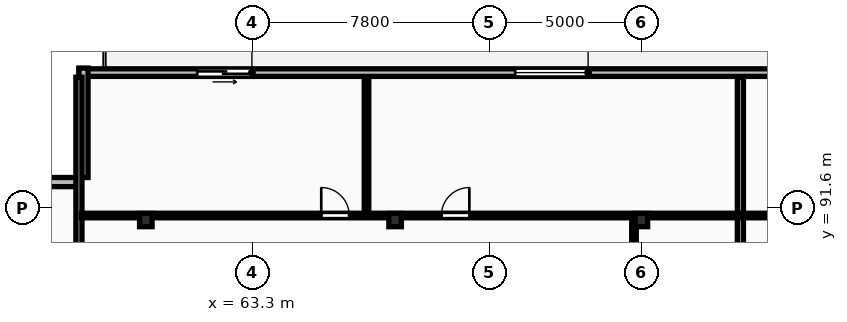
"""IFC4 building model, lengths in metres.
Left out: names, types, materials, properties, quantities, classifications, styles, units other than length and angle.
Written with IfcOpenShell. Run it as: python <this file> out.ifc"""

import sys

from ifc_helpers import new_model, si_unit, direction, frame, frame_2d, origin, origin_2d, place, context, subcontext, project, spatial, rectangle, i_section, extrude, element, fill, save


model = new_model("IFC4")
c1 = context("Model", 3, precision=1e-05, world=origin(), true_north=direction((0.0, 1.0)))
c2 = subcontext(c1, "Body", "Model", "MODEL_VIEW")
j1 = project(units=[si_unit("LENGTHUNIT", "METRE"), si_unit("PLANEANGLEUNIT", "RADIAN")], contexts=[c1])
p1 = place(None, origin())
s1 = spatial("IfcSite", under=j1, at=p1, CompositionType="ELEMENT")
p2 = place(p1, origin())
s2 = spatial("IfcBuilding", under=s1, at=p2, CompositionType="ELEMENT")
p3 = place(p2, frame((0.0, 0.0, 150.1)))
s3 = spatial("IfcBuildingStorey", under=s2, at=p3, CompositionType="ELEMENT", Elevation=150.1)
for number, where, z_axis, x_axis in (
    (1, (59.8, 91.2, 0.0), (0.0, 0.0, 1.0), (1.0, 0.0, 0.0)),
    (2, (68.0, 91.2, 0.0), (0.0, 0.0, 1.0), (1.0, 0.0, 0.0)),
    (3, (76.1, 91.2, 0.0), (0.0, 0.0, 1.0), (1.0, 0.0, 0.0)),
):
    element("IfcColumn", number, at=place(p3, frame(where, z_axis=z_axis, x_axis=x_axis)), inside=s3, PredefinedType="COLUMN", context=c2, shape_type="SweptSolid", body=[
        extrude(i_section(OverallWidth=0.412, OverallDepth=0.437, WebThickness=0.036, FlangeThickness=0.052, FilletRadius=0.015, at=origin_2d()), origin(), (0.0, 0.0, 1.0), 3.6),
    ])
p4 = place(p3, frame((130.6, 96.05, 0.0), z_axis=(0.0, 0.0, 1.0), x_axis=(-1.0, 0.0, 0.0)))
e4 = element("IfcWall", 4, at=p4, inside=s3, PredefinedType="STANDARD", context=c2, shape_type="SweptSolid", body=[
    extrude(rectangle(XDim=73.0, YDim=0.25, at=frame_2d((36.5, 0.0))), origin(), (0.0, 0.0, 1.0), 3.31),
])
p5 = place(p4, frame((67.311, 0.0, 0.0)))
e5 = element("IfcOpeningElement", 5, at=p5, cuts=e4, PredefinedType="OPENING", context=c2, shape_type="SweptSolid", body=[
    extrude(rectangle(XDim=1.8, YDim=2.2, at=frame_2d((0.9, 1.1))), frame((0.0, 0.135, 0.0), z_axis=(0.0, -1.0, 0.0), x_axis=(1.0, 0.0, 0.0)), (0.0, 0.0, 1.0), 0.27),
])
p6 = place(p4, frame((56.252, 0.0, 0.85)))
e6 = element("IfcOpeningElement", 6, at=p6, cuts=e4, PredefinedType="OPENING", context=c2, shape_type="SweptSolid", body=[
    extrude(rectangle(XDim=2.4, YDim=1.9, at=frame_2d((1.2, 0.95))), frame((0.0, 0.135, 0.0), z_axis=(0.0, -1.0, 0.0), x_axis=(1.0, 0.0, 0.0)), (0.0, 0.0, 1.0), 0.27),
])
p7 = place(p4, frame((46.071, 0.0, 0.0)))
e7 = element("IfcOpeningElement", 7, at=p7, cuts=e4, PredefinedType="OPENING", context=c2, shape_type="SweptSolid", body=[
    extrude(rectangle(XDim=1.8, YDim=2.2, at=frame_2d((0.9, 1.1))), frame((0.0, 0.135, 0.0), z_axis=(0.0, -1.0, 0.0), x_axis=(1.0, 0.0, 0.0)), (0.0, 0.0, 1.0), 0.27),
])
p8 = place(p4, frame((36.161, 0.0, 0.85)))
e8 = element("IfcOpeningElement", 8, at=p8, cuts=e4, PredefinedType="OPENING", context=c2, shape_type="SweptSolid", body=[
    extrude(rectangle(XDim=2.4, YDim=1.9, at=frame_2d((1.2, 0.95))), frame((0.0, 0.135, 0.0), z_axis=(0.0, -1.0, 0.0), x_axis=(1.0, 0.0, 0.0)), (0.0, 0.0, 1.0), 0.27),
])
p9 = place(p4, frame((26.569, 0.0, 0.0)))
e9 = element("IfcOpeningElement", 9, at=p9, cuts=e4, PredefinedType="OPENING", context=c2, shape_type="SweptSolid", body=[
    extrude(rectangle(XDim=1.8, YDim=2.2, at=frame_2d((0.9, 1.1))), frame((0.0, 0.135, 0.0), z_axis=(0.0, -1.0, 0.0), x_axis=(1.0, 0.0, 0.0)), (0.0, 0.0, 1.0), 0.27),
])
p10 = place(p4, frame((16.458, 0.0, 0.85)))
e10 = element("IfcOpeningElement", 10, at=p10, cuts=e4, PredefinedType="OPENING", context=c2, shape_type="SweptSolid", body=[
    extrude(rectangle(XDim=2.4, YDim=1.9, at=frame_2d((1.2, 0.95))), frame((0.0, 0.135, 0.0), z_axis=(0.0, -1.0, 0.0), x_axis=(1.0, 0.0, 0.0)), (0.0, 0.0, 1.0), 0.27),
])
p11 = place(p4, frame((7.042, 0.0, 0.0)))
e11 = element("IfcOpeningElement", 11, at=p11, cuts=e4, PredefinedType="OPENING", context=c2, shape_type="SweptSolid", body=[
    extrude(rectangle(XDim=1.8, YDim=2.2, at=frame_2d((0.9, 1.1))), frame((0.0, 0.135, 0.0), z_axis=(0.0, -1.0, 0.0), x_axis=(1.0, 0.0, 0.0)), (0.0, 0.0, 1.0), 0.27),
])
p12 = place(p4, frame((0.9, 0.0, 0.85)))
e12 = element("IfcOpeningElement", 12, at=p12, cuts=e4, PredefinedType="OPENING", context=c2, shape_type="SweptSolid", body=[
    extrude(rectangle(XDim=2.4, YDim=1.9, at=frame_2d((1.2, 0.95))), frame((0.0, 0.135, 0.0), z_axis=(0.0, -1.0, 0.0), x_axis=(1.0, 0.0, 0.0)), (0.0, 0.0, 1.0), 0.27),
])
p13 = place(p3, frame((57.75, 96.2, 0.0), z_axis=(0.0, 0.0, 1.0), x_axis=(0.0, -1.0, 0.0)))
e13 = element("IfcWall", 13, at=p13, inside=s3, PredefinedType="STANDARD", context=c2, shape_type="SweptSolid", body=[
    extrude(rectangle(XDim=3.6, YDim=0.3, at=frame_2d((1.8, 0.0))), origin(), (0.0, 0.0, 1.0), 3.31),
])
p14 = place(p3, frame((57.6, 92.45, 0.0), z_axis=(0.0, 0.0, 1.0), x_axis=(-1.0, 0.0, 0.0)))
e14 = element("IfcWall", 14, at=p14, inside=s3, PredefinedType="STANDARD", context=c2, shape_type="SweptSolid", body=[
    extrude(rectangle(XDim=3.6, YDim=0.3, at=frame_2d((1.8, 0.0))), origin(), (0.0, 0.0, 1.0), 3.31),
])
for number, where, z_axis, x_axis in (
    (15, (57.6, 69.83, 0.0), (0.0, 0.0, 1.0), (0.0, 1.0, 0.0)),
    (16, (79.357, 69.83, 0.0), (0.0, 0.0, 1.0), (0.0, 1.0, 0.0)),
):
    element("IfcWall", number, at=place(p3, frame(where, z_axis=z_axis, x_axis=x_axis)), inside=s3, PredefinedType="PARTITIONING", context=c2, shape_type="SweptSolid", body=[
        extrude(rectangle(XDim=26.07, YDim=0.2, at=frame_2d((13.035, 0.0))), origin(), (0.0, 0.0, 1.0), 3.31),
    ])
p15 = place(p3, frame((75.857, 69.81, 0.0), z_axis=(0.0, 0.0, 1.0), x_axis=(0.0, 1.0, 0.0)))
e17 = element("IfcWall", 17, at=p15, inside=s3, PredefinedType="PARTITIONING", context=c2, shape_type="SweptSolid", body=[
    extrude(rectangle(XDim=21.48, YDim=0.15, at=frame_2d((10.74, 0.0))), origin(), (0.0, 0.0, 1.0), 2.617),
])
p16 = place(p15, frame((2.406, 0.0, 0.0)))
e18 = element("IfcOpeningElement", 18, at=p16, cuts=e17, PredefinedType="OPENING", context=c2, shape_type="SweptSolid", body=[
    extrude(rectangle(XDim=0.96, YDim=2.1, at=frame_2d((0.48, 1.05))), frame((0.0, 0.085, 0.0), z_axis=(0.0, -1.0, 0.0), x_axis=(1.0, 0.0, 0.0)), (0.0, 0.0, 1.0), 0.17),
])
p17 = place(p15, frame((6.133, 0.0, 0.0)))
e19 = element("IfcOpeningElement", 19, at=p17, cuts=e17, PredefinedType="OPENING", context=c2, shape_type="SweptSolid", body=[
    extrude(rectangle(XDim=0.88, YDim=2.06, at=frame_2d((0.44, 1.03))), frame((0.0, 0.085, 0.0), z_axis=(0.0, -1.0, 0.0), x_axis=(1.0, 0.0, 0.0)), (0.0, 0.0, 1.0), 0.17),
])
p18 = place(p15, frame((11.336, 0.0, 0.0)))
e20 = element("IfcOpeningElement", 20, at=p18, cuts=e17, PredefinedType="OPENING", context=c2, shape_type="SweptSolid", body=[
    extrude(rectangle(XDim=0.84, YDim=2.04, at=frame_2d((0.42, 1.02))), frame((0.0, 0.085, 0.0), z_axis=(0.0, -1.0, 0.0), x_axis=(1.0, 0.0, 0.0)), (0.0, 0.0, 1.0), 0.17),
])
p19 = place(p3, frame((67.059, 91.43, 0.0), z_axis=(0.0, 0.0, 1.0), x_axis=(0.0, 1.0, 0.0)))
e21 = element("IfcWall", 21, at=p19, inside=s3, PredefinedType="PARTITIONING", context=c2, shape_type="SweptSolid", body=[
    extrude(rectangle(XDim=4.47, YDim=0.15, at=frame_2d((2.235, 0.0))), origin(), (0.0, 0.0, 1.0), 3.31),
])
p20 = place(p3, frame((57.68, 91.35, 0.0), z_axis=(0.0, 0.0, 1.0), x_axis=(1.0, 0.0, 0.0)))
e22 = element("IfcWall", 22, at=p20, inside=s3, PredefinedType="PARTITIONING", context=c2, shape_type="SweptSolid", body=[
    extrude(rectangle(XDim=21.597, YDim=0.15, at=frame_2d((10.799, 0.0))), origin(), (0.0, 0.0, 1.0), 3.003),
])
p21 = place(p20, frame((7.89, 0.0, 0.0)))
e23 = element("IfcOpeningElement", 23, at=p21, cuts=e22, PredefinedType="OPENING", context=c2, shape_type="SweptSolid", body=[
    extrude(rectangle(XDim=0.92, YDim=2.08, at=frame_2d((0.46, 1.04))), frame((0.0, 0.085, 0.0), z_axis=(0.0, -1.0, 0.0), x_axis=(1.0, 0.0, 0.0)), (0.0, 0.0, 1.0), 0.17),
])
p22 = place(p20, frame((11.842, 0.0, 0.0)))
e24 = element("IfcOpeningElement", 24, at=p22, cuts=e22, PredefinedType="OPENING", context=c2, shape_type="SweptSolid", body=[
    extrude(rectangle(XDim=0.92, YDim=2.08, at=frame_2d((0.46, 1.04))), frame((0.0, 0.085, 0.0), z_axis=(0.0, -1.0, 0.0), x_axis=(1.0, 0.0, 0.0)), (0.0, 0.0, 1.0), 0.17),
])
p23 = place(p3, frame((79.437, 91.35, 0.0), z_axis=(0.0, 0.0, 1.0), x_axis=(1.0, 0.0, 0.0)))
e25 = element("IfcWall", 25, at=p23, inside=s3, PredefinedType="PARTITIONING", context=c2, shape_type="SweptSolid", body=[
    extrude(rectangle(XDim=19.299, YDim=0.15, at=frame_2d((9.649, 0.0))), origin(), (0.0, 0.0, 1.0), 3.003),
])
p24 = place(p23, frame((7.155, 0.0, 0.0)))
e26 = element("IfcOpeningElement", 26, at=p24, cuts=e25, PredefinedType="OPENING", context=c2, shape_type="SweptSolid", body=[
    extrude(rectangle(XDim=0.94, YDim=2.1, at=frame_2d((0.47, 1.05))), frame((0.0, 0.085, 0.0), z_axis=(0.0, -1.0, 0.0), x_axis=(1.0, 0.0, 0.0)), (0.0, 0.0, 1.0), 0.17),
])
p25 = place(p23, frame((9.179, 0.0, 0.0)))
e27 = element("IfcOpeningElement", 27, at=p25, cuts=e25, PredefinedType="OPENING", context=c2, shape_type="SweptSolid", body=[
    extrude(rectangle(XDim=0.94, YDim=2.1, at=frame_2d((0.47, 1.05))), frame((0.0, 0.085, 0.0), z_axis=(0.0, -1.0, 0.0), x_axis=(1.0, 0.0, 0.0)), (0.0, 0.0, 1.0), 0.17),
])
p26 = place(p5, origin())
e28 = element("IfcDoor", 28, at=p26, inside=s3, OperationType="SLIDING_TO_LEFT", PredefinedType="DOOR", context=c2, shape_type="SweptSolid", body=[
    extrude(rectangle(XDim=1.8, YDim=2.2, at=frame_2d((0.9, 1.1))), frame((0.0, 0.025, 0.0), z_axis=(0.0, -1.0, 0.0), x_axis=(1.0, 0.0, 0.0)), (0.0, 0.0, 1.0), 0.05),
])
fill(e5, e28)
p27 = place(p6, origin())
e29 = element("IfcWindow", 29, at=p27, inside=s3, PartitioningType="DOUBLE_PANEL_VERTICAL", PredefinedType="WINDOW", context=c2, shape_type="SweptSolid", body=[
    extrude(rectangle(XDim=2.4, YDim=1.9, at=frame_2d((1.2, 0.95))), frame((0.0, 0.03, 0.0), z_axis=(0.0, -1.0, 0.0), x_axis=(1.0, 0.0, 0.0)), (0.0, 0.0, 1.0), 0.06),
])
fill(e6, e29)
p28 = place(p21, origin())
e30 = element("IfcDoor", 30, at=p28, inside=s3, OperationType="SINGLE_SWING_LEFT", PredefinedType="DOOR", context=c2, shape_type="SweptSolid", body=[
    extrude(rectangle(XDim=0.92, YDim=2.08, at=frame_2d((0.46, 1.04))), frame((0.0, 0.025, 0.0), z_axis=(0.0, -1.0, 0.0), x_axis=(1.0, 0.0, 0.0)), (0.0, 0.0, 1.0), 0.05),
])
fill(e23, e30)
p29 = place(p22, origin())
e31 = element("IfcDoor", 31, at=p29, inside=s3, OperationType="SINGLE_SWING_RIGHT", PredefinedType="DOOR", context=c2, shape_type="SweptSolid", body=[
    extrude(rectangle(XDim=0.92, YDim=2.08, at=frame_2d((0.46, 1.04))), frame((0.0, 0.025, 0.0), z_axis=(0.0, -1.0, 0.0), x_axis=(1.0, 0.0, 0.0)), (0.0, 0.0, 1.0), 0.05),
])
fill(e24, e31)
save(model, sys.argv[1])
